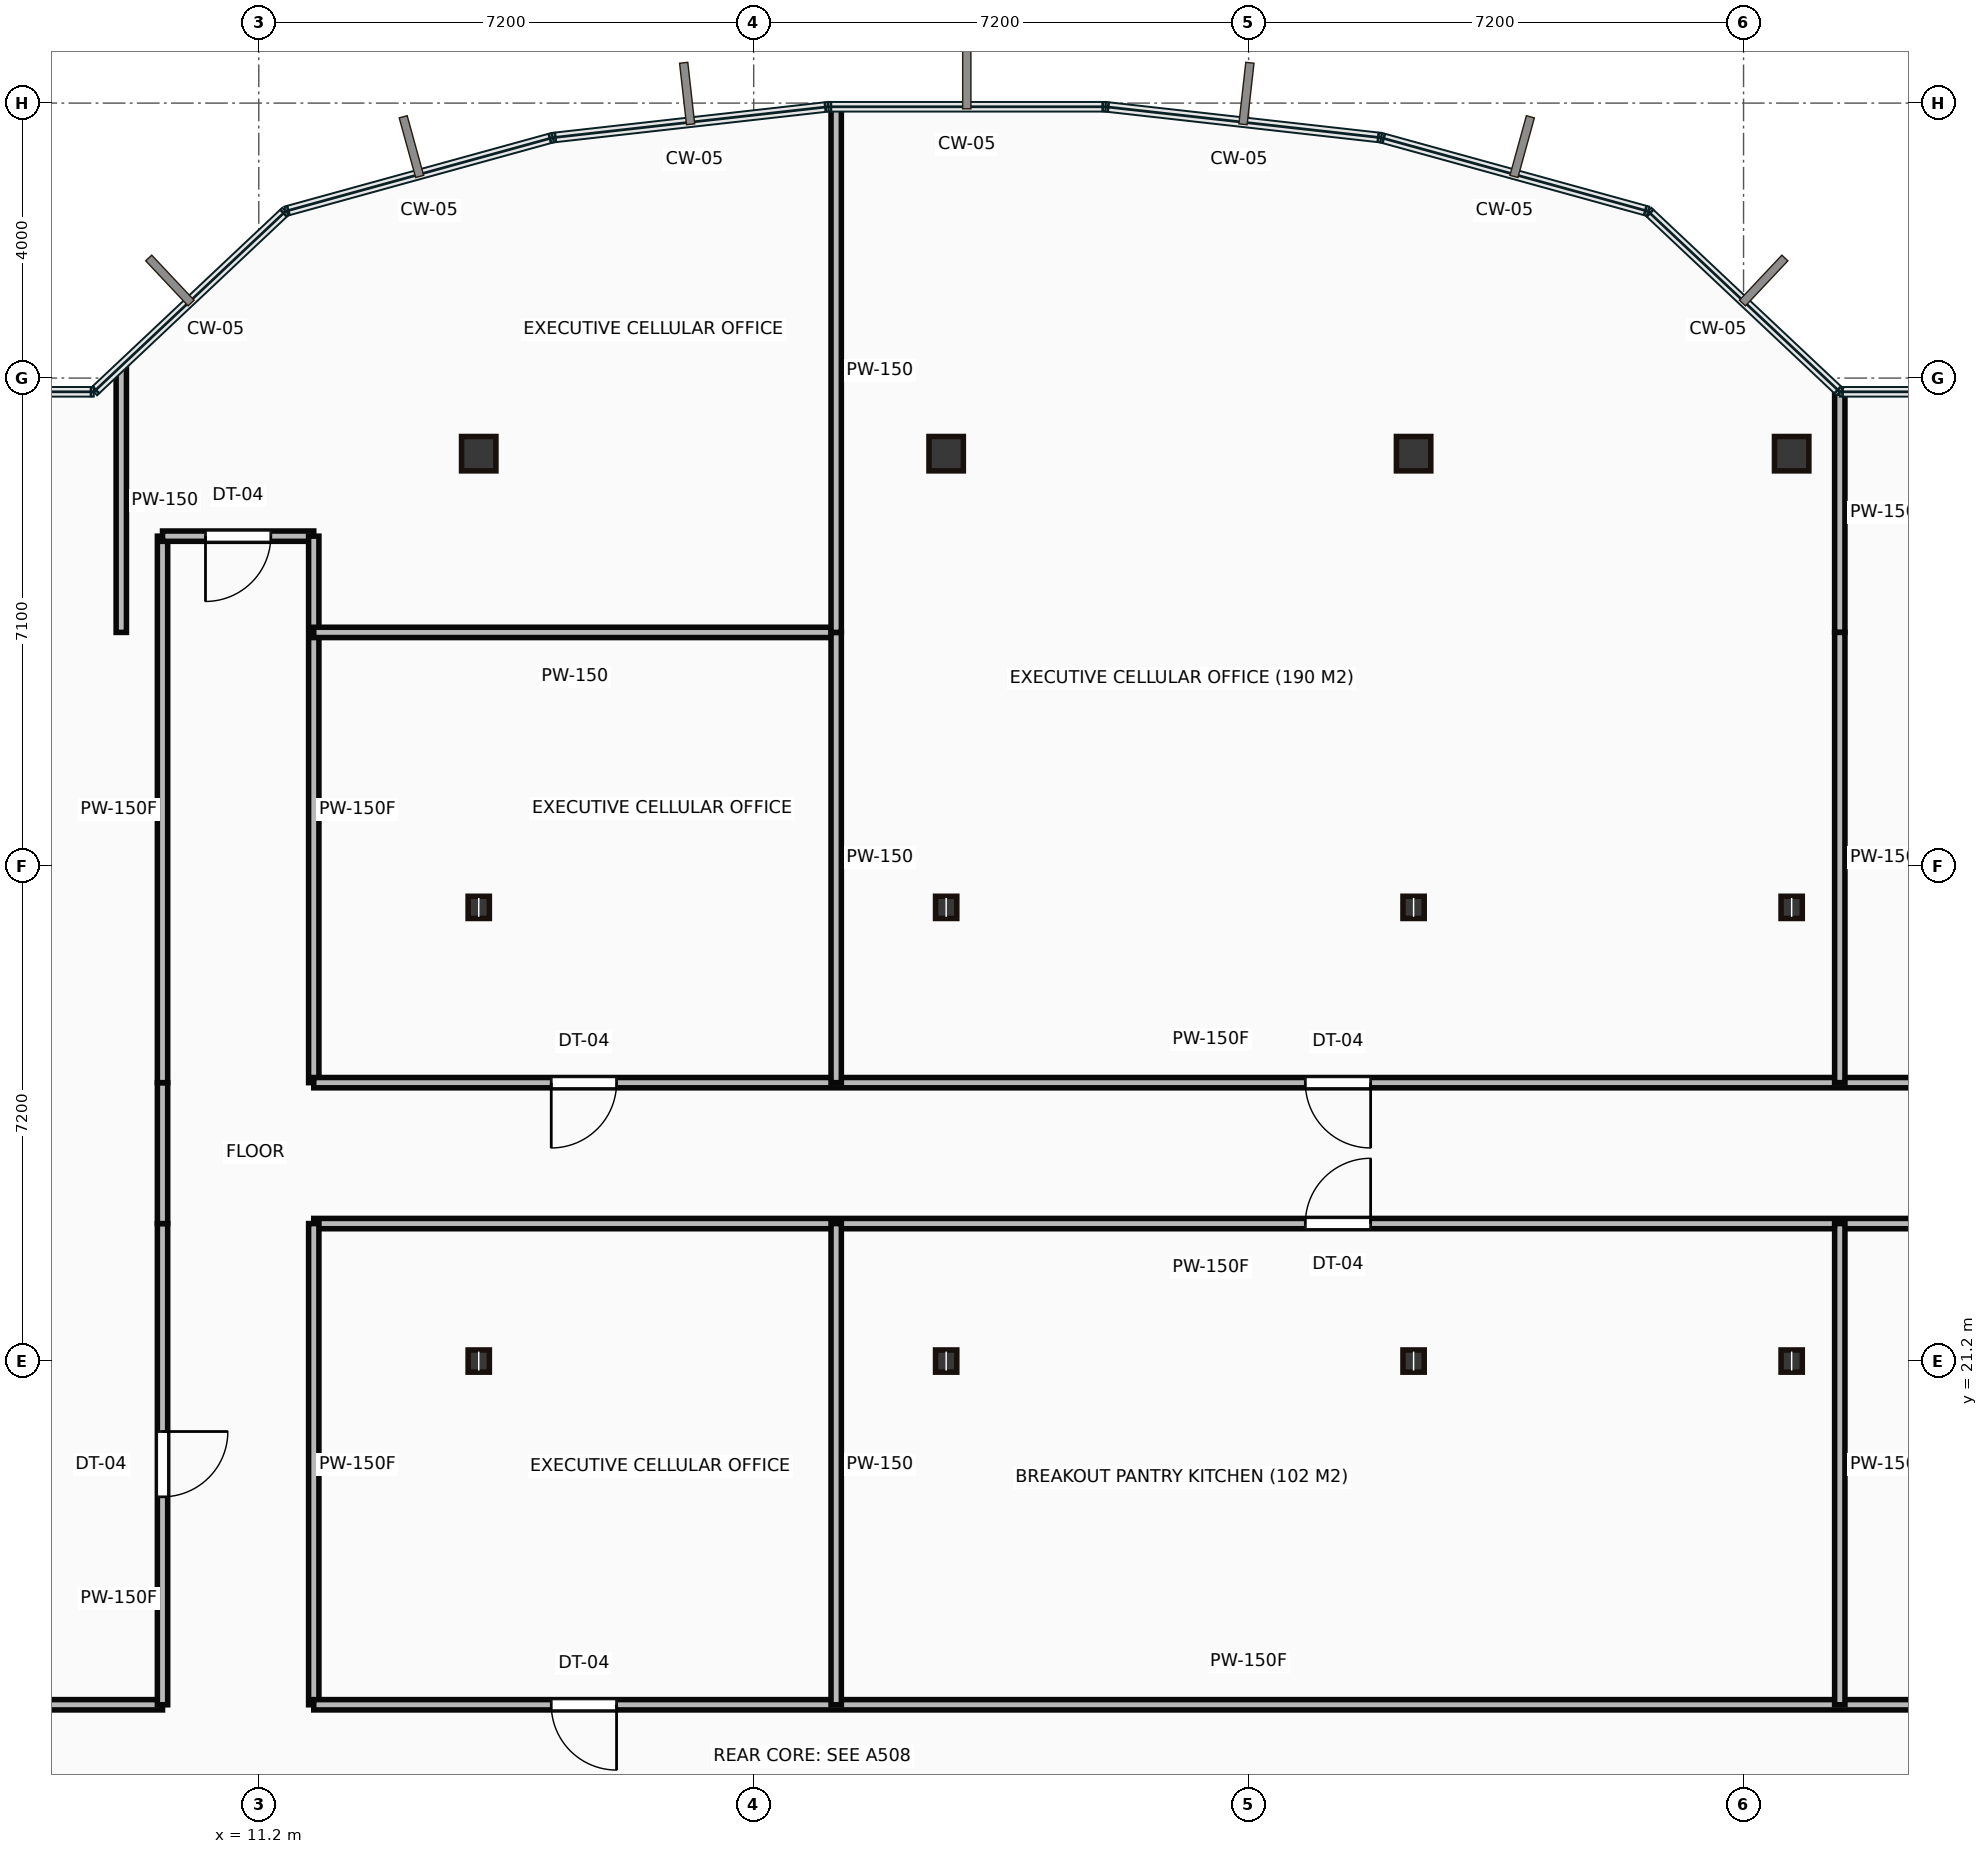
"""IFC4 building model, lengths in metres.
Left out: names, types, materials, properties, quantities, classifications, styles, units other than length and angle.
Written with IfcOpenShell. Run it as: python <this file> out.ifc"""

import sys

from ifc_helpers import new_model, si_unit, direction, frame, frame_2d, origin, origin_2d, place, context, subcontext, project, spatial, rectangle, hollow_rectangle, i_section, extrude, source, transform, mapped, element, fill, save


model = new_model("IFC4")
c1 = context("Model", 3, precision=1e-05, world=origin(), true_north=direction((0.0, 1.0)))
c2 = subcontext(c1, "Body", "Model", "MODEL_VIEW")
j1 = project(units=[si_unit("LENGTHUNIT", "METRE"), si_unit("PLANEANGLEUNIT", "RADIAN")], contexts=[c1])
p1 = place(None, origin())
s1 = spatial("IfcSite", under=j1, at=p1, CompositionType="ELEMENT")
p2 = place(p1, origin())
s2 = spatial("IfcBuilding", under=s1, at=p2, CompositionType="ELEMENT")
p3 = place(p2, frame((0.0, 0.0, 188.6)))
s3 = spatial("IfcBuildingStorey", under=s2, at=p3, CompositionType="ELEMENT", Elevation=188.6)
m1 = source(origin(), c2, "Body", "SweptSolid", [
    extrude(i_section(OverallWidth=0.309, OverallDepth=0.323, WebThickness=0.014, FlangeThickness=0.023, at=origin_2d()), origin(), (0.0, 0.0, 1.0), 3.65),
])
for number, where, z_axis, x_axis in (
    (1, (14.4, 21.2, 0.0), (0.0, 0.0, 1.0), (1.0, 0.0, 0.0)),
    (2, (14.4, 27.8, 0.0), (0.0, 0.0, 1.0), (1.0, 0.0, 0.0)),
):
    element("IfcColumn", number, at=place(p3, frame(where, z_axis=z_axis, x_axis=x_axis)), inside=s3, PredefinedType="COLUMN", context=c2, shape_type="MappedRepresentation", body=[
        mapped(m1, transform((0.0, 0.0, 0.0))),
    ])
m2 = source(origin(), c2, "Body", "SweptSolid", [
    extrude(hollow_rectangle(XDim=0.5, YDim=0.5, WallThickness=0.022, at=origin_2d()), origin(), (0.0, 0.0, 1.0), 3.65),
])
p4 = place(p3, frame((14.4, 34.4, 0.0), z_axis=(0.0, 0.0, 1.0), x_axis=(1.0, 0.0, 0.0)))
e3 = element("IfcColumn", 3, at=p4, inside=s3, PredefinedType="COLUMN", context=c2, shape_type="MappedRepresentation", body=[
    mapped(m2, transform((0.0, 0.0, 0.0))),
])
for number, where, z_axis, x_axis in (
    (4, (21.2, 21.2, 0.0), (0.0, 0.0, 1.0), (1.0, 0.0, 0.0)),
    (5, (21.2, 27.8, 0.0), (0.0, 0.0, 1.0), (1.0, 0.0, 0.0)),
):
    element("IfcColumn", number, at=place(p3, frame(where, z_axis=z_axis, x_axis=x_axis)), inside=s3, PredefinedType="COLUMN", context=c2, shape_type="MappedRepresentation", body=[
        mapped(m1, transform((0.0, 0.0, 0.0))),
    ])
p5 = place(p3, frame((21.2, 34.4, 0.0), z_axis=(0.0, 0.0, 1.0), x_axis=(1.0, 0.0, 0.0)))
e6 = element("IfcColumn", 6, at=p5, inside=s3, PredefinedType="COLUMN", context=c2, shape_type="MappedRepresentation", body=[
    mapped(m2, transform((0.0, 0.0, 0.0))),
])
for number, where, z_axis, x_axis in (
    (7, (28.0, 21.2, 0.0), (0.0, 0.0, 1.0), (1.0, 0.0, 0.0)),
    (8, (28.0, 27.8, 0.0), (0.0, 0.0, 1.0), (1.0, 0.0, 0.0)),
):
    element("IfcColumn", number, at=place(p3, frame(where, z_axis=z_axis, x_axis=x_axis)), inside=s3, PredefinedType="COLUMN", context=c2, shape_type="MappedRepresentation", body=[
        mapped(m1, transform((0.0, 0.0, 0.0))),
    ])
p6 = place(p3, frame((28.0, 34.4, 0.0), z_axis=(0.0, 0.0, 1.0), x_axis=(1.0, 0.0, 0.0)))
e9 = element("IfcColumn", 9, at=p6, inside=s3, PredefinedType="COLUMN", context=c2, shape_type="MappedRepresentation", body=[
    mapped(m2, transform((0.0, 0.0, 0.0))),
])
for number, where, z_axis, x_axis in (
    (10, (33.5, 21.2, 0.0), (0.0, 0.0, 1.0), (1.0, 0.0, 0.0)),
    (11, (33.5, 27.8, 0.0), (0.0, 0.0, 1.0), (1.0, 0.0, 0.0)),
):
    element("IfcColumn", number, at=place(p3, frame(where, z_axis=z_axis, x_axis=x_axis)), inside=s3, PredefinedType="COLUMN", context=c2, shape_type="MappedRepresentation", body=[
        mapped(m1, transform((0.0, 0.0, 0.0))),
    ])
p7 = place(p3, frame((33.5, 34.4, 0.0), z_axis=(0.0, 0.0, 1.0), x_axis=(1.0, 0.0, 0.0)))
e12 = element("IfcColumn", 12, at=p7, inside=s3, PredefinedType="COLUMN", context=c2, shape_type="MappedRepresentation", body=[
    mapped(m2, transform((0.0, 0.0, 0.0))),
])
m3 = source(origin(), c2, "Body", "SweptSolid", [
    extrude(rectangle(XDim=5.2, YDim=0.15, at=frame_2d((2.6, 0.0))), origin(), (0.0, 0.0, 1.0), 3.4),
])
p8 = place(p3, frame((4.6, 16.2, 0.0), z_axis=(0.0, 0.0, 1.0), x_axis=(1.0, 0.0, 0.0)))
e13 = element("IfcWall", 13, at=p8, inside=s3, PredefinedType="PARTITIONING", context=c2, shape_type="MappedRepresentation", body=[
    mapped(m3, transform((0.0, 0.0, 0.0))),
])
m4 = source(origin(), c2, "Body", "SweptSolid", [
    extrude(rectangle(XDim=7.0, YDim=0.15, at=frame_2d((3.5, 0.0))), origin(), (0.0, 0.0, 1.0), 3.4),
])
p9 = place(p3, frame((9.8, 16.2, 0.0), z_axis=(0.0, 0.0, 1.0), x_axis=(0.0, 1.0, 0.0)))
e14 = element("IfcWall", 14, at=p9, inside=s3, PredefinedType="PARTITIONING", context=c2, shape_type="MappedRepresentation", body=[
    mapped(m4, transform((0.0, 0.0, 0.0))),
])
p10 = place(p9, frame((3.025, 0.0, 0.0)))
e15 = element("IfcOpeningElement", 15, at=p10, cuts=e14, PredefinedType="OPENING", context=c2, shape_type="SweptSolid", body=[
    extrude(rectangle(XDim=0.95, YDim=2.15, at=frame_2d((0.475, 1.075))), frame((0.0, 0.085, 0.0), z_axis=(0.0, -1.0, 0.0), x_axis=(1.0, 0.0, 0.0)), (0.0, 0.0, 1.0), 0.17),
])
m5 = source(origin(), c2, "Body", "SweptSolid", [
    extrude(rectangle(XDim=2.05, YDim=0.15, at=frame_2d((1.025, 0.0))), origin(), (0.0, 0.0, 1.0), 3.4),
])
p11 = place(p3, frame((9.8, 23.2, 0.0), z_axis=(0.0, 0.0, 1.0), x_axis=(0.0, 1.0, 0.0)))
e16 = element("IfcWall", 16, at=p11, inside=s3, PredefinedType="PARTITIONING", context=c2, shape_type="MappedRepresentation", body=[
    mapped(m5, transform((0.0, 0.0, 0.0))),
])
m6 = source(origin(), c2, "Body", "SweptSolid", [
    extrude(rectangle(XDim=7.95, YDim=0.15, at=frame_2d((3.975, 0.0))), origin(), (0.0, 0.0, 1.0), 3.4),
])
p12 = place(p3, frame((9.8, 25.25, 0.0), z_axis=(0.0, 0.0, 1.0), x_axis=(0.0, 1.0, 0.0)))
e17 = element("IfcWall", 17, at=p12, inside=s3, PredefinedType="PARTITIONING", context=c2, shape_type="MappedRepresentation", body=[
    mapped(m6, transform((0.0, 0.0, 0.0))),
])
m7 = source(origin(), c2, "Body", "SweptSolid", [
    extrude(rectangle(XDim=2.2, YDim=0.15, at=frame_2d((1.1, 0.0))), origin(), (0.0, 0.0, 1.0), 3.4),
])
p13 = place(p3, frame((9.8, 33.2, 0.0), z_axis=(0.0, 0.0, 1.0), x_axis=(1.0, 0.0, 0.0)))
e18 = element("IfcWall", 18, at=p13, inside=s3, PredefinedType="PARTITIONING", context=c2, shape_type="MappedRepresentation", body=[
    mapped(m7, transform((0.0, 0.0, 0.0))),
])
p14 = place(p13, frame((0.625, 0.0, 0.0)))
e19 = element("IfcOpeningElement", 19, at=p14, cuts=e18, PredefinedType="OPENING", context=c2, shape_type="SweptSolid", body=[
    extrude(rectangle(XDim=0.95, YDim=2.15, at=frame_2d((0.475, 1.075))), frame((0.0, 0.085, 0.0), z_axis=(0.0, -1.0, 0.0), x_axis=(1.0, 0.0, 0.0)), (0.0, 0.0, 1.0), 0.17),
])
p15 = place(p3, frame((12.0, 33.2, 0.0), z_axis=(0.0, 0.0, 1.0), x_axis=(0.0, -1.0, 0.0)))
e20 = element("IfcWall", 20, at=p15, inside=s3, PredefinedType="PARTITIONING", context=c2, shape_type="MappedRepresentation", body=[
    mapped(m6, transform((0.0, 0.0, 0.0))),
])
m8 = source(origin(), c2, "Body", "SweptSolid", [
    extrude(rectangle(XDim=26.1, YDim=0.15, at=frame_2d((13.05, 0.0))), origin(), (0.0, 0.0, 1.0), 3.4),
])
p16 = place(p3, frame((12.0, 25.25, 0.0), z_axis=(0.0, 0.0, 1.0), x_axis=(1.0, 0.0, 0.0)))
e21 = element("IfcWall", 21, at=p16, inside=s3, PredefinedType="PARTITIONING", context=c2, shape_type="MappedRepresentation", body=[
    mapped(m8, transform((0.0, 0.0, 0.0))),
])
p17 = place(p16, frame((3.455, 0.0, 0.0)))
e22 = element("IfcOpeningElement", 22, at=p17, cuts=e21, PredefinedType="OPENING", context=c2, shape_type="SweptSolid", body=[
    extrude(rectangle(XDim=0.95, YDim=2.15, at=frame_2d((0.475, 1.075))), frame((0.0, 0.085, 0.0), z_axis=(0.0, -1.0, 0.0), x_axis=(1.0, 0.0, 0.0)), (0.0, 0.0, 1.0), 0.17),
])
p18 = place(p16, frame((14.425, 0.0, 0.0)))
e23 = element("IfcOpeningElement", 23, at=p18, cuts=e21, PredefinedType="OPENING", context=c2, shape_type="SweptSolid", body=[
    extrude(rectangle(XDim=0.95, YDim=2.15, at=frame_2d((0.475, 1.075))), frame((0.0, 0.085, 0.0), z_axis=(0.0, -1.0, 0.0), x_axis=(1.0, 0.0, 0.0)), (0.0, 0.0, 1.0), 0.17),
])
p19 = place(p16, frame((23.545, 0.0, 0.0)))
e24 = element("IfcOpeningElement", 24, at=p19, cuts=e21, PredefinedType="OPENING", context=c2, shape_type="SweptSolid", body=[
    extrude(rectangle(XDim=0.95, YDim=2.15, at=frame_2d((0.475, 1.075))), frame((0.0, 0.085, 0.0), z_axis=(0.0, -1.0, 0.0), x_axis=(1.0, 0.0, 0.0)), (0.0, 0.0, 1.0), 0.17),
])
p20 = place(p3, frame((38.1, 23.2, 0.0), z_axis=(0.0, 0.0, 1.0), x_axis=(-1.0, 0.0, 0.0)))
e25 = element("IfcWall", 25, at=p20, inside=s3, PredefinedType="PARTITIONING", context=c2, shape_type="MappedRepresentation", body=[
    mapped(m8, transform((0.0, 0.0, 0.0))),
])
p21 = place(p20, frame((10.725, 0.0, 0.0)))
e26 = element("IfcOpeningElement", 26, at=p21, cuts=e25, PredefinedType="OPENING", context=c2, shape_type="SweptSolid", body=[
    extrude(rectangle(XDim=0.95, YDim=2.15, at=frame_2d((0.475, 1.075))), frame((0.0, 0.085, 0.0), z_axis=(0.0, -1.0, 0.0), x_axis=(1.0, 0.0, 0.0)), (0.0, 0.0, 1.0), 0.17),
])
p22 = place(p3, frame((12.0, 23.2, 0.0), z_axis=(0.0, 0.0, 1.0), x_axis=(0.0, -1.0, 0.0)))
e27 = element("IfcWall", 27, at=p22, inside=s3, PredefinedType="PARTITIONING", context=c2, shape_type="MappedRepresentation", body=[
    mapped(m4, transform((0.0, 0.0, 0.0))),
])
m9 = source(origin(), c2, "Body", "SweptSolid", [
    extrude(rectangle(XDim=27.2, YDim=0.15, at=frame_2d((13.6, 0.0))), origin(), (0.0, 0.0, 1.0), 3.4),
])
p23 = place(p3, frame((12.0, 16.2, 0.0), z_axis=(0.0, 0.0, 1.0), x_axis=(1.0, 0.0, 0.0)))
e28 = element("IfcWall", 28, at=p23, inside=s3, PredefinedType="PARTITIONING", context=c2, shape_type="MappedRepresentation", body=[
    mapped(m9, transform((0.0, 0.0, 0.0))),
])
p24 = place(p23, frame((3.455, 0.0, 0.0)))
e29 = element("IfcOpeningElement", 29, at=p24, cuts=e28, PredefinedType="OPENING", context=c2, shape_type="SweptSolid", body=[
    extrude(rectangle(XDim=0.95, YDim=2.15, at=frame_2d((0.475, 1.075))), frame((0.0, 0.085, 0.0), z_axis=(0.0, -1.0, 0.0), x_axis=(1.0, 0.0, 0.0)), (0.0, 0.0, 1.0), 0.17),
])
p25 = place(p23, frame((24.095, 0.0, 0.0)))
e30 = element("IfcOpeningElement", 30, at=p25, cuts=e28, PredefinedType="OPENING", context=c2, shape_type="SweptSolid", body=[
    extrude(rectangle(XDim=0.95, YDim=2.15, at=frame_2d((0.475, 1.075))), frame((0.0, 0.085, 0.0), z_axis=(0.0, -1.0, 0.0), x_axis=(1.0, 0.0, 0.0)), (0.0, 0.0, 1.0), 0.17),
])
m10 = source(origin(), c2, "Body", "SweptSolid", [
    extrude(rectangle(XDim=3.849, YDim=0.15, at=frame_2d((1.925, 0.0))), origin(), (0.0, 0.0, 1.0), 3.4),
])
p26 = place(p3, frame((9.2, 35.649, 0.0), z_axis=(0.0, 0.0, 1.0), x_axis=(0.0, -1.0, 0.0)))
e31 = element("IfcWall", 31, at=p26, inside=s3, PredefinedType="PARTITIONING", context=c2, shape_type="MappedRepresentation", body=[
    mapped(m10, transform((0.0, 0.0, 0.0))),
])
m11 = source(origin(), c2, "Body", "SweptSolid", [
    extrude(rectangle(XDim=7.6, YDim=0.15, at=frame_2d((3.8, 0.0))), origin(), (0.0, 0.0, 1.0), 3.4),
])
p27 = place(p3, frame((19.6, 31.8, 0.0), z_axis=(0.0, 0.0, 1.0), x_axis=(-1.0, 0.0, 0.0)))
e32 = element("IfcWall", 32, at=p27, inside=s3, PredefinedType="PARTITIONING", context=c2, shape_type="MappedRepresentation", body=[
    mapped(m11, transform((0.0, 0.0, 0.0))),
])
p28 = place(p3, frame((19.6, 23.2, 0.0), z_axis=(0.0, 0.0, 1.0), x_axis=(0.0, -1.0, 0.0)))
e33 = element("IfcWall", 33, at=p28, inside=s3, PredefinedType="PARTITIONING", context=c2, shape_type="MappedRepresentation", body=[
    mapped(m4, transform((0.0, 0.0, 0.0))),
])
m12 = source(origin(), c2, "Body", "SweptSolid", [
    extrude(rectangle(XDim=6.55, YDim=0.15, at=frame_2d((3.275, 0.0))), origin(), (0.0, 0.0, 1.0), 3.4),
])
p29 = place(p3, frame((19.6, 31.8, 0.0), z_axis=(0.0, 0.0, 1.0), x_axis=(0.0, -1.0, 0.0)))
e34 = element("IfcWall", 34, at=p29, inside=s3, PredefinedType="PARTITIONING", context=c2, shape_type="MappedRepresentation", body=[
    mapped(m12, transform((0.0, 0.0, 0.0))),
])
m13 = source(origin(), c2, "Body", "SweptSolid", [
    extrude(rectangle(XDim=7.627, YDim=0.15, at=frame_2d((3.813, 0.0))), origin(), (0.0, 0.0, 1.0), 3.4),
])
p30 = place(p3, frame((19.6, 39.427, 0.0), z_axis=(0.0, 0.0, 1.0), x_axis=(0.0, -1.0, 0.0)))
e35 = element("IfcWall", 35, at=p30, inside=s3, PredefinedType="PARTITIONING", context=c2, shape_type="MappedRepresentation", body=[
    mapped(m13, transform((0.0, 0.0, 0.0))),
])
p31 = place(p3, frame((34.2, 23.2, 0.0), z_axis=(0.0, 0.0, 1.0), x_axis=(0.0, -1.0, 0.0)))
e36 = element("IfcWall", 36, at=p31, inside=s3, PredefinedType="PARTITIONING", context=c2, shape_type="MappedRepresentation", body=[
    mapped(m4, transform((0.0, 0.0, 0.0))),
])
m14 = source(origin(), c2, "Body", "SweptSolid", [
    extrude(rectangle(XDim=3.48, YDim=0.15, at=frame_2d((1.74, 0.0))), origin(), (0.0, 0.0, 1.0), 3.4),
])
p32 = place(p3, frame((34.2, 35.28, 0.0), z_axis=(0.0, 0.0, 1.0), x_axis=(0.0, -1.0, 0.0)))
e37 = element("IfcWall", 37, at=p32, inside=s3, PredefinedType="PARTITIONING", context=c2, shape_type="MappedRepresentation", body=[
    mapped(m14, transform((0.0, 0.0, 0.0))),
])
p33 = place(p3, frame((34.2, 31.8, 0.0), z_axis=(0.0, 0.0, 1.0), x_axis=(0.0, -1.0, 0.0)))
e38 = element("IfcWall", 38, at=p33, inside=s3, PredefinedType="PARTITIONING", context=c2, shape_type="MappedRepresentation", body=[
    mapped(m12, transform((0.0, 0.0, 0.0))),
])
m15 = source(origin(), c2, "Body", "SweptSolid", [
    extrude(rectangle(XDim=0.95, YDim=2.15, at=frame_2d((0.475, 1.075))), frame((0.0, 0.025, 0.0), z_axis=(0.0, -1.0, 0.0), x_axis=(1.0, 0.0, 0.0)), (0.0, 0.0, 1.0), 0.05),
])
p34 = place(p10, origin())
e39 = element("IfcDoor", 39, at=p34, inside=s3, OperationType="SINGLE_SWING_RIGHT", PredefinedType="DOOR", context=c2, shape_type="MappedRepresentation", body=[
    mapped(m15, transform((0.0, 0.0, 0.0))),
])
fill(e15, e39)
p35 = place(p14, origin())
e40 = element("IfcDoor", 40, at=p35, inside=s3, OperationType="SINGLE_SWING_LEFT", PredefinedType="DOOR", context=c2, shape_type="MappedRepresentation", body=[
    mapped(m15, transform((0.0, 0.0, 0.0))),
])
fill(e19, e40)
p36 = place(p24, origin())
e41 = element("IfcDoor", 41, at=p36, inside=s3, OperationType="SINGLE_SWING_RIGHT", PredefinedType="DOOR", context=c2, shape_type="MappedRepresentation", body=[
    mapped(m15, transform((0.0, 0.0, 0.0))),
])
fill(e29, e41)
p37 = place(p17, origin())
e42 = element("IfcDoor", 42, at=p37, inside=s3, OperationType="SINGLE_SWING_LEFT", PredefinedType="DOOR", context=c2, shape_type="MappedRepresentation", body=[
    mapped(m15, transform((0.0, 0.0, 0.0))),
])
fill(e22, e42)
p38 = place(p18, origin())
e43 = element("IfcDoor", 43, at=p38, inside=s3, OperationType="SINGLE_SWING_RIGHT", PredefinedType="DOOR", context=c2, shape_type="MappedRepresentation", body=[
    mapped(m15, transform((0.0, 0.0, 0.0))),
])
fill(e23, e43)
p39 = place(p21, origin())
e44 = element("IfcDoor", 44, at=p39, inside=s3, OperationType="SINGLE_SWING_LEFT", PredefinedType="DOOR", context=c2, shape_type="MappedRepresentation", body=[
    mapped(m15, transform((0.0, 0.0, 0.0))),
])
fill(e26, e44)
save(model, sys.argv[1])
